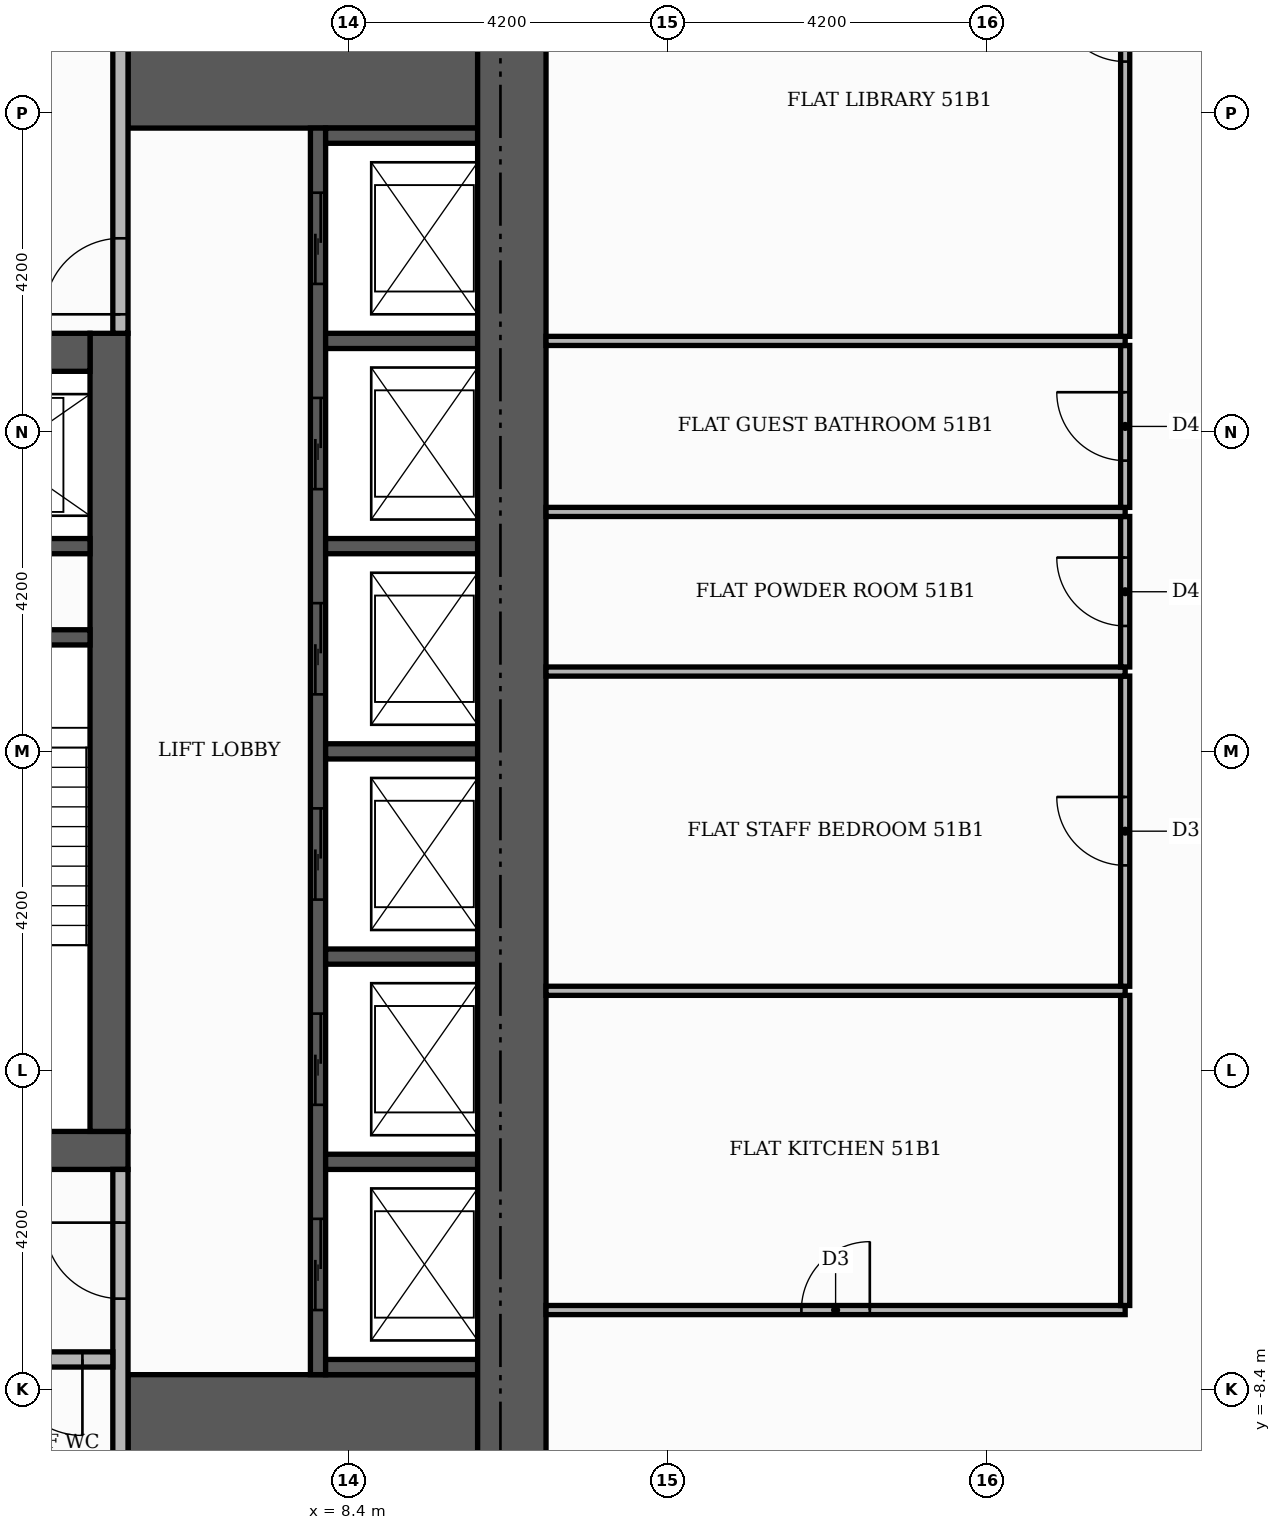
"""IFC4 building model, lengths in metres.
Left out: names, types, materials, properties, quantities, classifications, styles, units other than length and angle.
Written with IfcOpenShell. Run it as: python <this file> out.ifc"""

import sys

from ifc_helpers import new_model, si_unit, direction, frame, frame_2d, origin, place, context, subcontext, project, spatial, rectangle, extrude, element, fill, save


model = new_model("IFC4")
c1 = context("Model", 3, precision=1e-05, world=origin(), true_north=direction((0.0, 1.0)))
c2 = subcontext(c1, "Body", "Model", "MODEL_VIEW")
j1 = project(units=[si_unit("LENGTHUNIT", "METRE"), si_unit("PLANEANGLEUNIT", "RADIAN")], contexts=[c1])
p1 = place(None, origin())
s1 = spatial("IfcSite", under=j1, at=p1, CompositionType="ELEMENT")
p2 = place(p1, origin())
s2 = spatial("IfcBuilding", under=s1, at=p2, CompositionType="ELEMENT")
p3 = place(p2, frame((0.0, 0.0, 215.7)))
s3 = spatial("IfcBuildingStorey", under=s2, at=p3, CompositionType="ELEMENT", Elevation=215.7)
p4 = place(p3, frame((-5.5, -5.25, 0.0), z_axis=(0.0, 0.0, 1.0), x_axis=(1.0, 0.0, 0.0)))
e1 = element("IfcWall", 1, at=p4, inside=s3, PredefinedType="SHEAR", context=c2, shape_type="SweptSolid", body=[
    extrude(rectangle(XDim=11.0, YDim=0.5, at=frame_2d((5.5, 0.0))), origin(), (0.0, 0.0, 1.0), 3.48),
])
p5 = place(p4, frame((4.9, 0.0, 0.0)))
e2 = element("IfcOpeningElement", 2, at=p5, cuts=e1, PredefinedType="OPENING", context=c2, shape_type="SweptSolid", body=[
    extrude(rectangle(XDim=1.2, YDim=2.1, at=frame_2d((0.6, 1.05))), frame((0.0, 0.26, 0.0), z_axis=(0.0, -1.0, 0.0), x_axis=(1.0, 0.0, 0.0)), (0.0, 0.0, 1.0), 0.52),
])
p6 = place(p3, frame((5.25, -5.0, 0.0), z_axis=(0.0, 0.0, 1.0), x_axis=(0.0, 1.0, 0.0)))
e3 = element("IfcWall", 3, at=p6, inside=s3, PredefinedType="SHEAR", context=c2, shape_type="SweptSolid", body=[
    extrude(rectangle(XDim=10.5, YDim=0.5, at=frame_2d((5.25, 0.0))), origin(), (0.0, 0.0, 1.0), 3.48),
])
p7 = place(p3, frame((-5.0, 5.25, 0.0), z_axis=(0.0, 0.0, 1.0), x_axis=(1.0, 0.0, 0.0)))
e4 = element("IfcWall", 4, at=p7, inside=s3, PredefinedType="SHEAR", context=c2, shape_type="SweptSolid", body=[
    extrude(rectangle(XDim=10.0, YDim=0.5, at=frame_2d((5.0, 0.0))), origin(), (0.0, 0.0, 1.0), 3.48),
])
p8 = place(p7, frame((4.4, 0.0, 0.0)))
e5 = element("IfcOpeningElement", 5, at=p8, cuts=e4, PredefinedType="OPENING", context=c2, shape_type="SweptSolid", body=[
    extrude(rectangle(XDim=1.2, YDim=2.1, at=frame_2d((0.6, 1.05))), frame((0.0, 0.26, 0.0), z_axis=(0.0, -1.0, 0.0), x_axis=(1.0, 0.0, 0.0)), (0.0, 0.0, 1.0), 0.52),
])
for number, where, z_axis, x_axis in (
    (6, (5.5, -9.15, 0.0), (0.0, 0.0, 1.0), (1.0, 0.0, 0.0)),
    (7, (5.5, 9.15, 0.0), (0.0, 0.0, 1.0), (1.0, 0.0, 0.0)),
):
    element("IfcWall", number, at=place(p3, frame(where, z_axis=z_axis, x_axis=x_axis)), inside=s3, PredefinedType="SHEAR", context=c2, shape_type="SweptSolid", body=[
        extrude(rectangle(XDim=4.6, YDim=1.9, at=frame_2d((2.3, 0.0))), origin(), (0.0, 0.0, 1.0), 3.48),
    ])
p9 = place(p3, frame((2.15, 1.5, 0.0), z_axis=(0.0, 0.0, 1.0), x_axis=(1.0, 0.0, 0.0)))
e8 = element("IfcWall", 8, at=p9, inside=s3, PredefinedType="SHEAR", context=c2, shape_type="SweptSolid", body=[
    extrude(rectangle(XDim=2.85, YDim=0.2, at=frame_2d((1.425, 0.0))), origin(), (0.0, 0.0, 1.0), 3.48),
])
p10 = place(p3, frame((8.0, -8.2, 0.0), z_axis=(0.0, 0.0, 1.0), x_axis=(0.0, 1.0, 0.0)))
e9 = element("IfcWall", 9, at=p10, inside=s3, PredefinedType="SHEAR", context=c2, shape_type="SweptSolid", body=[
    extrude(rectangle(XDim=16.4, YDim=0.2, at=frame_2d((8.2, 0.0))), origin(), (0.0, 0.0, 1.0), 3.48),
])
p11 = place(p10, frame((0.85, 0.0, 0.0)))
e10 = element("IfcOpeningElement", 10, at=p11, cuts=e9, PredefinedType="OPENING", context=c2, shape_type="SweptSolid", body=[
    extrude(rectangle(XDim=1.2, YDim=2.1, at=frame_2d((0.6, 1.05))), frame((0.0, 0.11, 0.0), z_axis=(0.0, -1.0, 0.0), x_axis=(1.0, 0.0, 0.0)), (0.0, 0.0, 1.0), 0.22),
])
p12 = place(p10, frame((3.55, 0.0, 0.0)))
e11 = element("IfcOpeningElement", 11, at=p12, cuts=e9, PredefinedType="OPENING", context=c2, shape_type="SweptSolid", body=[
    extrude(rectangle(XDim=1.2, YDim=2.1, at=frame_2d((0.6, 1.05))), frame((0.0, 0.11, 0.0), z_axis=(0.0, -1.0, 0.0), x_axis=(1.0, 0.0, 0.0)), (0.0, 0.0, 1.0), 0.22),
])
p13 = place(p10, frame((6.25, 0.0, 0.0)))
e12 = element("IfcOpeningElement", 12, at=p13, cuts=e9, PredefinedType="OPENING", context=c2, shape_type="SweptSolid", body=[
    extrude(rectangle(XDim=1.2, YDim=2.1, at=frame_2d((0.6, 1.05))), frame((0.0, 0.11, 0.0), z_axis=(0.0, -1.0, 0.0), x_axis=(1.0, 0.0, 0.0)), (0.0, 0.0, 1.0), 0.22),
])
p14 = place(p10, frame((8.95, 0.0, 0.0)))
e13 = element("IfcOpeningElement", 13, at=p14, cuts=e9, PredefinedType="OPENING", context=c2, shape_type="SweptSolid", body=[
    extrude(rectangle(XDim=1.2, YDim=2.1, at=frame_2d((0.6, 1.05))), frame((0.0, 0.11, 0.0), z_axis=(0.0, -1.0, 0.0), x_axis=(1.0, 0.0, 0.0)), (0.0, 0.0, 1.0), 0.22),
])
p15 = place(p10, frame((11.65, 0.0, 0.0)))
e14 = element("IfcOpeningElement", 14, at=p15, cuts=e9, PredefinedType="OPENING", context=c2, shape_type="SweptSolid", body=[
    extrude(rectangle(XDim=1.2, YDim=2.1, at=frame_2d((0.6, 1.05))), frame((0.0, 0.11, 0.0), z_axis=(0.0, -1.0, 0.0), x_axis=(1.0, 0.0, 0.0)), (0.0, 0.0, 1.0), 0.22),
])
p16 = place(p10, frame((14.35, 0.0, 0.0)))
e15 = element("IfcOpeningElement", 15, at=p16, cuts=e9, PredefinedType="OPENING", context=c2, shape_type="SweptSolid", body=[
    extrude(rectangle(XDim=1.2, YDim=2.1, at=frame_2d((0.6, 1.05))), frame((0.0, 0.11, 0.0), z_axis=(0.0, -1.0, 0.0), x_axis=(1.0, 0.0, 0.0)), (0.0, 0.0, 1.0), 0.22),
])
for number, where, z_axis, x_axis in (
    (16, (8.1, -8.1, 0.0), (0.0, 0.0, 1.0), (1.0, 0.0, 0.0)),
    (17, (8.1, -5.4, 0.0), (0.0, 0.0, 1.0), (1.0, 0.0, 0.0)),
    (18, (8.1, -2.7, 0.0), (0.0, 0.0, 1.0), (1.0, 0.0, 0.0)),
    (19, (8.1, 0.0, 0.0), (0.0, 0.0, 1.0), (1.0, 0.0, 0.0)),
):
    element("IfcWall", number, at=place(p3, frame(where, z_axis=z_axis, x_axis=x_axis)), inside=s3, PredefinedType="SHEAR", context=c2, shape_type="SweptSolid", body=[
        extrude(rectangle(XDim=2.0, YDim=0.2, at=frame_2d((1.0, 0.0))), origin(), (0.0, 0.0, 1.0), 3.48),
    ])
p17 = place(p3, frame((2.15, 2.7, 0.0), z_axis=(0.0, 0.0, 1.0), x_axis=(1.0, 0.0, 0.0)))
e20 = element("IfcWall", 20, at=p17, inside=s3, PredefinedType="SHEAR", context=c2, shape_type="SweptSolid", body=[
    extrude(rectangle(XDim=2.85, YDim=0.2, at=frame_2d((1.425, 0.0))), origin(), (0.0, 0.0, 1.0), 3.48),
])
for number, where, z_axis, x_axis in (
    (21, (8.1, 2.7, 0.0), (0.0, 0.0, 1.0), (1.0, 0.0, 0.0)),
    (22, (8.1, 5.4, 0.0), (0.0, 0.0, 1.0), (1.0, 0.0, 0.0)),
    (23, (8.1, 8.1, 0.0), (0.0, 0.0, 1.0), (1.0, 0.0, 0.0)),
):
    element("IfcWall", number, at=place(p3, frame(where, z_axis=z_axis, x_axis=x_axis)), inside=s3, PredefinedType="SHEAR", context=c2, shape_type="SweptSolid", body=[
        extrude(rectangle(XDim=2.0, YDim=0.2, at=frame_2d((1.0, 0.0))), origin(), (0.0, 0.0, 1.0), 3.48),
    ])
p18 = place(p3, frame((10.55, -10.1, 0.0), z_axis=(0.0, 0.0, 1.0), x_axis=(0.0, 1.0, 0.0)))
e24 = element("IfcWall", 24, at=p18, inside=s3, PredefinedType="SHEAR", context=c2, shape_type="SweptSolid", body=[
    extrude(rectangle(XDim=20.2, YDim=0.9, at=frame_2d((10.1, 0.0))), origin(), (0.0, 0.0, 1.0), 3.48),
])
p19 = place(p3, frame((5.4, -10.1, 0.0), z_axis=(0.0, 0.0, 1.0), x_axis=(0.0, 1.0, 0.0)))
e25 = element("IfcWall", 25, at=p19, inside=s3, PredefinedType="PARTITIONING", context=c2, shape_type="SweptSolid", body=[
    extrude(rectangle(XDim=4.6, YDim=0.2, at=frame_2d((2.3, 0.0))), origin(), (0.0, 0.0, 1.0), 3.48),
])
p20 = place(p19, frame((2.9, 0.0, 0.0)))
e26 = element("IfcOpeningElement", 26, at=p20, cuts=e25, PredefinedType="OPENING", context=c2, shape_type="SweptSolid", body=[
    extrude(rectangle(XDim=1.0, YDim=2.1, at=frame_2d((0.5, 1.05))), frame((0.0, 0.11, 0.0), z_axis=(0.0, -1.0, 0.0), x_axis=(1.0, 0.0, 0.0)), (0.0, 0.0, 1.0), 0.22),
])
p21 = place(p3, frame((3.55, -8.0, 0.0), z_axis=(0.0, 0.0, 1.0), x_axis=(1.0, 0.0, 0.0)))
e27 = element("IfcWall", 27, at=p21, inside=s3, PredefinedType="PARTITIONING", context=c2, shape_type="SweptSolid", body=[
    extrude(rectangle(XDim=1.75, YDim=0.2, at=frame_2d((0.875, 0.0))), origin(), (0.0, 0.0, 1.0), 3.48),
])
p22 = place(p21, frame((0.35, 0.0, 0.0)))
e28 = element("IfcOpeningElement", 28, at=p22, cuts=e27, PredefinedType="OPENING", context=c2, shape_type="SweptSolid", body=[
    extrude(rectangle(XDim=1.0, YDim=2.1, at=frame_2d((0.5, 1.05))), frame((0.0, 0.11, 0.0), z_axis=(0.0, -1.0, 0.0), x_axis=(1.0, 0.0, 0.0)), (0.0, 0.0, 1.0), 0.22),
])
p23 = place(p3, frame((5.4, 5.5, 0.0), z_axis=(0.0, 0.0, 1.0), x_axis=(0.0, 1.0, 0.0)))
e29 = element("IfcWall", 29, at=p23, inside=s3, PredefinedType="PARTITIONING", context=c2, shape_type="SweptSolid", body=[
    extrude(rectangle(XDim=4.6, YDim=0.2, at=frame_2d((2.3, 0.0))), origin(), (0.0, 0.0, 1.0), 3.48),
])
p24 = place(p23, frame((0.25, 0.0, 0.0)))
e30 = element("IfcOpeningElement", 30, at=p24, cuts=e29, PredefinedType="OPENING", context=c2, shape_type="SweptSolid", body=[
    extrude(rectangle(XDim=1.0, YDim=2.1, at=frame_2d((0.5, 1.05))), frame((0.0, 0.11, 0.0), z_axis=(0.0, -1.0, 0.0), x_axis=(1.0, 0.0, 0.0)), (0.0, 0.0, 1.0), 0.22),
])
p25 = place(p3, frame((11.0, -7.35, 0.0), z_axis=(0.0, 0.0, 1.0), x_axis=(1.0, 0.0, 0.0)))
e31 = element("IfcWall", 31, at=p25, inside=s3, PredefinedType="PARTITIONING", context=c2, shape_type="SweptSolid", body=[
    extrude(rectangle(XDim=7.62, YDim=0.12, at=frame_2d((3.81, 0.0))), origin(), (0.0, 0.0, 1.0), 3.48),
])
p26 = place(p25, frame((3.36, 0.0, 0.0)))
e32 = element("IfcOpeningElement", 32, at=p26, cuts=e31, PredefinedType="OPENING", context=c2, shape_type="SweptSolid", body=[
    extrude(rectangle(XDim=0.9, YDim=2.1, at=frame_2d((0.45, 1.05))), frame((0.0, 0.07, 0.0), z_axis=(0.0, -1.0, 0.0), x_axis=(1.0, 0.0, 0.0)), (0.0, 0.0, 1.0), 0.14),
])
p27 = place(p3, frame((18.62, -7.29, 0.0), z_axis=(0.0, 0.0, 1.0), x_axis=(0.0, 1.0, 0.0)))
e33 = element("IfcWall", 33, at=p27, inside=s3, PredefinedType="PARTITIONING", context=c2, shape_type="SweptSolid", body=[
    extrude(rectangle(XDim=4.08, YDim=0.12, at=frame_2d((2.04, 0.0))), origin(), (0.0, 0.0, 1.0), 3.48),
])
p28 = place(p3, frame((11.0, -3.15, 0.0), z_axis=(0.0, 0.0, 1.0), x_axis=(1.0, 0.0, 0.0)))
e34 = element("IfcWall", 34, at=p28, inside=s3, PredefinedType="PARTITIONING", context=c2, shape_type="SweptSolid", body=[
    extrude(rectangle(XDim=7.62, YDim=0.12, at=frame_2d((3.81, 0.0))), origin(), (0.0, 0.0, 1.0), 3.48),
])
p29 = place(p3, frame((18.62, -3.09, 0.0), z_axis=(0.0, 0.0, 1.0), x_axis=(0.0, 1.0, 0.0)))
e35 = element("IfcWall", 35, at=p29, inside=s3, PredefinedType="PARTITIONING", context=c2, shape_type="SweptSolid", body=[
    extrude(rectangle(XDim=4.08, YDim=0.12, at=frame_2d((2.04, 0.0))), origin(), (0.0, 0.0, 1.0), 3.48),
])
p30 = place(p29, frame((1.59, 0.0, 0.0)))
e36 = element("IfcOpeningElement", 36, at=p30, cuts=e35, PredefinedType="OPENING", context=c2, shape_type="SweptSolid", body=[
    extrude(rectangle(XDim=0.9, YDim=2.1, at=frame_2d((0.45, 1.05))), frame((0.0, 0.07, 0.0), z_axis=(0.0, -1.0, 0.0), x_axis=(1.0, 0.0, 0.0)), (0.0, 0.0, 1.0), 0.14),
])
p31 = place(p3, frame((11.0, 1.05, 0.0), z_axis=(0.0, 0.0, 1.0), x_axis=(1.0, 0.0, 0.0)))
e37 = element("IfcWall", 37, at=p31, inside=s3, PredefinedType="PARTITIONING", context=c2, shape_type="SweptSolid", body=[
    extrude(rectangle(XDim=7.62, YDim=0.12, at=frame_2d((3.81, 0.0))), origin(), (0.0, 0.0, 1.0), 3.48),
])
p32 = place(p3, frame((18.62, 1.11, 0.0), z_axis=(0.0, 0.0, 1.0), x_axis=(0.0, 1.0, 0.0)))
e38 = element("IfcWall", 38, at=p32, inside=s3, PredefinedType="PARTITIONING", context=c2, shape_type="SweptSolid", body=[
    extrude(rectangle(XDim=1.98, YDim=0.12, at=frame_2d((0.99, 0.0))), origin(), (0.0, 0.0, 1.0), 3.48),
])
p33 = place(p32, frame((0.54, 0.0, 0.0)))
e39 = element("IfcOpeningElement", 39, at=p33, cuts=e38, PredefinedType="OPENING", context=c2, shape_type="SweptSolid", body=[
    extrude(rectangle(XDim=0.9, YDim=2.1, at=frame_2d((0.45, 1.05))), frame((0.0, 0.07, 0.0), z_axis=(0.0, -1.0, 0.0), x_axis=(1.0, 0.0, 0.0)), (0.0, 0.0, 1.0), 0.14),
])
p34 = place(p3, frame((11.0, 3.15, 0.0), z_axis=(0.0, 0.0, 1.0), x_axis=(1.0, 0.0, 0.0)))
e40 = element("IfcWall", 40, at=p34, inside=s3, PredefinedType="PARTITIONING", context=c2, shape_type="SweptSolid", body=[
    extrude(rectangle(XDim=7.62, YDim=0.12, at=frame_2d((3.81, 0.0))), origin(), (0.0, 0.0, 1.0), 3.48),
])
p35 = place(p3, frame((18.62, 3.21, 0.0), z_axis=(0.0, 0.0, 1.0), x_axis=(0.0, 1.0, 0.0)))
e41 = element("IfcWall", 41, at=p35, inside=s3, PredefinedType="PARTITIONING", context=c2, shape_type="SweptSolid", body=[
    extrude(rectangle(XDim=2.13, YDim=0.12, at=frame_2d((1.065, 0.0))), origin(), (0.0, 0.0, 1.0), 3.48),
])
p36 = place(p35, frame((0.615, 0.0, 0.0)))
e42 = element("IfcOpeningElement", 42, at=p36, cuts=e41, PredefinedType="OPENING", context=c2, shape_type="SweptSolid", body=[
    extrude(rectangle(XDim=0.9, YDim=2.1, at=frame_2d((0.45, 1.05))), frame((0.0, 0.07, 0.0), z_axis=(0.0, -1.0, 0.0), x_axis=(1.0, 0.0, 0.0)), (0.0, 0.0, 1.0), 0.14),
])
p37 = place(p3, frame((11.0, 5.4, 0.0), z_axis=(0.0, 0.0, 1.0), x_axis=(1.0, 0.0, 0.0)))
e43 = element("IfcWall", 43, at=p37, inside=s3, PredefinedType="PARTITIONING", context=c2, shape_type="SweptSolid", body=[
    extrude(rectangle(XDim=7.62, YDim=0.12, at=frame_2d((3.81, 0.0))), origin(), (0.0, 0.0, 1.0), 3.48),
])
p38 = place(p3, frame((18.62, 5.46, 0.0), z_axis=(0.0, 0.0, 1.0), x_axis=(0.0, 1.0, 0.0)))
e44 = element("IfcWall", 44, at=p38, inside=s3, PredefinedType="PARTITIONING", context=c2, shape_type="SweptSolid", body=[
    extrude(rectangle(XDim=8.09, YDim=0.12, at=frame_2d((4.045, 0.0))), origin(), (0.0, 0.0, 1.0), 3.48),
])
p39 = place(p38, frame((3.615, 0.0, 0.0)))
e45 = element("IfcOpeningElement", 45, at=p39, cuts=e44, PredefinedType="OPENING", context=c2, shape_type="SweptSolid", body=[
    extrude(rectangle(XDim=0.9, YDim=2.1, at=frame_2d((0.45, 1.05))), frame((0.0, 0.07, 0.0), z_axis=(0.0, -1.0, 0.0), x_axis=(1.0, 0.0, 0.0)), (0.0, 0.0, 1.0), 0.14),
])
p40 = place(p11, origin())
e46 = element("IfcDoor", 46, at=p40, inside=s3, OperationType="SLIDING_TO_LEFT", PredefinedType="DOOR", context=c2, shape_type="SweptSolid", body=[
    extrude(rectangle(XDim=1.2, YDim=2.1, at=frame_2d((0.6, 1.05))), frame((0.0, 0.025, 0.0), z_axis=(0.0, -1.0, 0.0), x_axis=(1.0, 0.0, 0.0)), (0.0, 0.0, 1.0), 0.05),
])
fill(e10, e46)
p41 = place(p12, origin())
e47 = element("IfcDoor", 47, at=p41, inside=s3, OperationType="SLIDING_TO_LEFT", PredefinedType="DOOR", context=c2, shape_type="SweptSolid", body=[
    extrude(rectangle(XDim=1.2, YDim=2.1, at=frame_2d((0.6, 1.05))), frame((0.0, 0.025, 0.0), z_axis=(0.0, -1.0, 0.0), x_axis=(1.0, 0.0, 0.0)), (0.0, 0.0, 1.0), 0.05),
])
fill(e11, e47)
p42 = place(p13, origin())
e48 = element("IfcDoor", 48, at=p42, inside=s3, OperationType="SLIDING_TO_LEFT", PredefinedType="DOOR", context=c2, shape_type="SweptSolid", body=[
    extrude(rectangle(XDim=1.2, YDim=2.1, at=frame_2d((0.6, 1.05))), frame((0.0, 0.025, 0.0), z_axis=(0.0, -1.0, 0.0), x_axis=(1.0, 0.0, 0.0)), (0.0, 0.0, 1.0), 0.05),
])
fill(e12, e48)
p43 = place(p14, origin())
e49 = element("IfcDoor", 49, at=p43, inside=s3, OperationType="SLIDING_TO_LEFT", PredefinedType="DOOR", context=c2, shape_type="SweptSolid", body=[
    extrude(rectangle(XDim=1.2, YDim=2.1, at=frame_2d((0.6, 1.05))), frame((0.0, 0.025, 0.0), z_axis=(0.0, -1.0, 0.0), x_axis=(1.0, 0.0, 0.0)), (0.0, 0.0, 1.0), 0.05),
])
fill(e13, e49)
p44 = place(p15, origin())
e50 = element("IfcDoor", 50, at=p44, inside=s3, OperationType="SLIDING_TO_LEFT", PredefinedType="DOOR", context=c2, shape_type="SweptSolid", body=[
    extrude(rectangle(XDim=1.2, YDim=2.1, at=frame_2d((0.6, 1.05))), frame((0.0, 0.025, 0.0), z_axis=(0.0, -1.0, 0.0), x_axis=(1.0, 0.0, 0.0)), (0.0, 0.0, 1.0), 0.05),
])
fill(e14, e50)
p45 = place(p16, origin())
e51 = element("IfcDoor", 51, at=p45, inside=s3, OperationType="SLIDING_TO_LEFT", PredefinedType="DOOR", context=c2, shape_type="SweptSolid", body=[
    extrude(rectangle(XDim=1.2, YDim=2.1, at=frame_2d((0.6, 1.05))), frame((0.0, 0.025, 0.0), z_axis=(0.0, -1.0, 0.0), x_axis=(1.0, 0.0, 0.0)), (0.0, 0.0, 1.0), 0.05),
])
fill(e15, e51)
p46 = place(p24, origin())
e52 = element("IfcDoor", 52, at=p46, inside=s3, OperationType="SINGLE_SWING_LEFT", PredefinedType="DOOR", context=c2, shape_type="SweptSolid", body=[
    extrude(rectangle(XDim=1.0, YDim=2.1, at=frame_2d((0.5, 1.05))), frame((0.0, 0.025, 0.0), z_axis=(0.0, -1.0, 0.0), x_axis=(1.0, 0.0, 0.0)), (0.0, 0.0, 1.0), 0.05),
])
fill(e30, e52)
p47 = place(p20, origin())
e53 = element("IfcDoor", 53, at=p47, inside=s3, OperationType="SINGLE_SWING_RIGHT", PredefinedType="DOOR", context=c2, shape_type="SweptSolid", body=[
    extrude(rectangle(XDim=1.0, YDim=2.1, at=frame_2d((0.5, 1.05))), frame((0.0, 0.025, 0.0), z_axis=(0.0, -1.0, 0.0), x_axis=(1.0, 0.0, 0.0)), (0.0, 0.0, 1.0), 0.05),
])
fill(e26, e53)
p48 = place(p22, frame((1.0, 0.0, 0.0), z_axis=(0.0, 0.0, 1.0), x_axis=(-1.0, 0.0, 0.0)))
e54 = element("IfcDoor", 54, at=p48, inside=s3, OperationType="SINGLE_SWING_RIGHT", PredefinedType="DOOR", context=c2, shape_type="SweptSolid", body=[
    extrude(rectangle(XDim=1.0, YDim=2.1, at=frame_2d((0.5, 1.05))), frame((0.0, 0.025, 0.0), z_axis=(0.0, -1.0, 0.0), x_axis=(1.0, 0.0, 0.0)), (0.0, 0.0, 1.0), 0.05),
])
fill(e28, e54)
p49 = place(p26, origin())
e55 = element("IfcDoor", 55, at=p49, inside=s3, OperationType="SINGLE_SWING_RIGHT", PredefinedType="DOOR", context=c2, shape_type="SweptSolid", body=[
    extrude(rectangle(XDim=0.9, YDim=2.1, at=frame_2d((0.45, 1.05))), frame((0.0, 0.025, 0.0), z_axis=(0.0, -1.0, 0.0), x_axis=(1.0, 0.0, 0.0)), (0.0, 0.0, 1.0), 0.05),
])
fill(e32, e55)
p50 = place(p30, origin())
e56 = element("IfcDoor", 56, at=p50, inside=s3, OperationType="SINGLE_SWING_RIGHT", PredefinedType="DOOR", context=c2, shape_type="SweptSolid", body=[
    extrude(rectangle(XDim=0.9, YDim=2.1, at=frame_2d((0.45, 1.05))), frame((0.0, 0.025, 0.0), z_axis=(0.0, -1.0, 0.0), x_axis=(1.0, 0.0, 0.0)), (0.0, 0.0, 1.0), 0.05),
])
fill(e36, e56)
p51 = place(p33, origin())
e57 = element("IfcDoor", 57, at=p51, inside=s3, OperationType="SINGLE_SWING_RIGHT", PredefinedType="DOOR", context=c2, shape_type="SweptSolid", body=[
    extrude(rectangle(XDim=0.9, YDim=2.1, at=frame_2d((0.45, 1.05))), frame((0.0, 0.025, 0.0), z_axis=(0.0, -1.0, 0.0), x_axis=(1.0, 0.0, 0.0)), (0.0, 0.0, 1.0), 0.05),
])
fill(e39, e57)
p52 = place(p36, origin())
e58 = element("IfcDoor", 58, at=p52, inside=s3, OperationType="SINGLE_SWING_RIGHT", PredefinedType="DOOR", context=c2, shape_type="SweptSolid", body=[
    extrude(rectangle(XDim=0.9, YDim=2.1, at=frame_2d((0.45, 1.05))), frame((0.0, 0.025, 0.0), z_axis=(0.0, -1.0, 0.0), x_axis=(1.0, 0.0, 0.0)), (0.0, 0.0, 1.0), 0.05),
])
fill(e42, e58)
p53 = place(p39, origin())
e59 = element("IfcDoor", 59, at=p53, inside=s3, OperationType="SINGLE_SWING_RIGHT", PredefinedType="DOOR", context=c2, shape_type="SweptSolid", body=[
    extrude(rectangle(XDim=0.9, YDim=2.1, at=frame_2d((0.45, 1.05))), frame((0.0, 0.025, 0.0), z_axis=(0.0, -1.0, 0.0), x_axis=(1.0, 0.0, 0.0)), (0.0, 0.0, 1.0), 0.05),
])
fill(e45, e59)
save(model, sys.argv[1])
